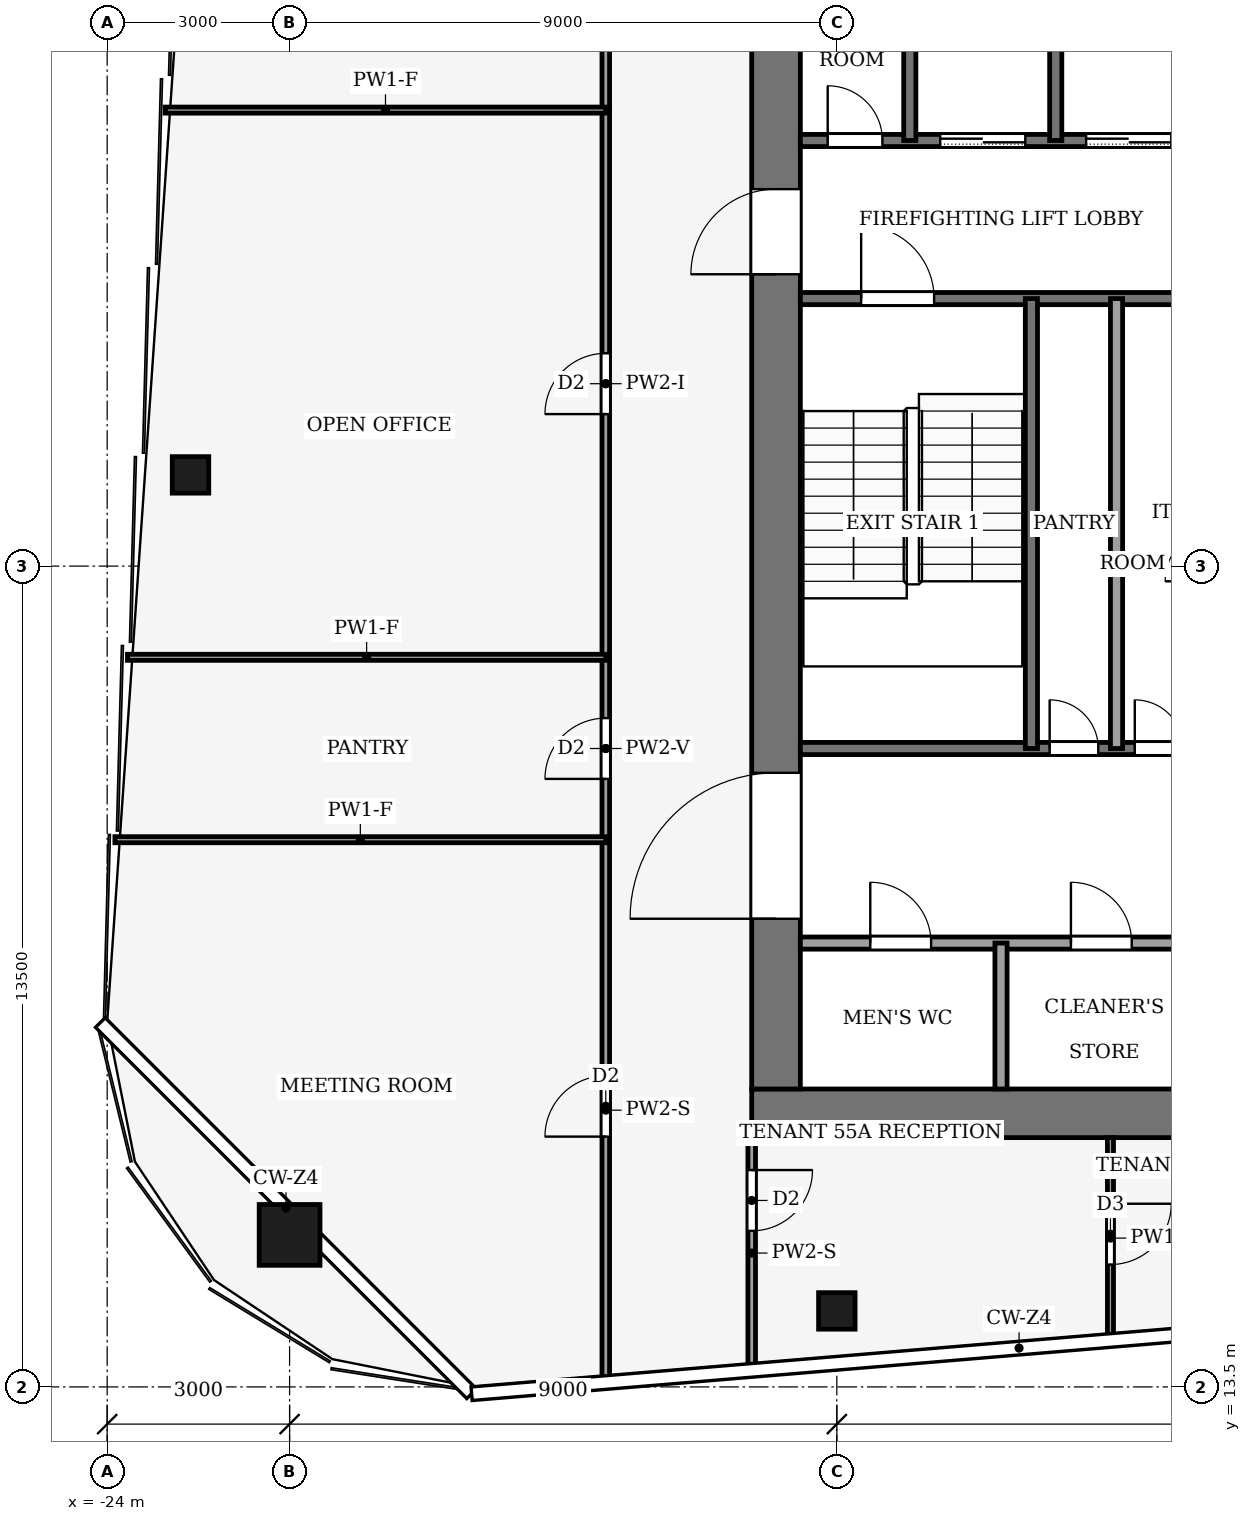
"""IFC4 building model, lengths in metres.
Left out: names, types, materials, properties, quantities, classifications, styles, units other than length and angle.
Written with IfcOpenShell. Run it as: python <this file> out.ifc"""

import sys

from ifc_helpers import new_model, si_unit, direction, frame, frame_2d, origin, origin_2d, place, context, subcontext, project, spatial, rectangle, hollow_rectangle, extrude, element, fill, save


model = new_model("IFC4")
c1 = context("Model", 3, precision=1e-05, world=origin(), true_north=direction((0.0, 1.0)))
c2 = subcontext(c1, "Body", "Model", "MODEL_VIEW")
j1 = project(units=[si_unit("LENGTHUNIT", "METRE"), si_unit("PLANEANGLEUNIT", "RADIAN")], contexts=[c1])
p1 = place(None, origin())
s1 = spatial("IfcSite", under=j1, at=p1, CompositionType="ELEMENT")
p2 = place(p1, origin())
s2 = spatial("IfcBuilding", under=s1, at=p2, CompositionType="ELEMENT")
p3 = place(p2, frame((0.0, 0.0, 242.0)))
s3 = spatial("IfcBuildingStorey", under=s2, at=p3, CompositionType="ELEMENT", Elevation=242.0)
p4 = place(p3, frame((-13.4, 18.0, -0.13), z_axis=(0.0, 0.0, 1.0), x_axis=(1.0, 0.0, 0.0)))
e1 = element("IfcWall", 1, at=p4, inside=s3, PredefinedType="SHEAR", context=c2, shape_type="SweptSolid", body=[
    extrude(rectangle(XDim=26.8, YDim=0.8, at=frame_2d((13.4, 0.0))), origin(), (0.0, 0.0, 1.0), 4.0),
])
p5 = place(p3, frame((-13.0, 18.4, -0.13), z_axis=(0.0, 0.0, 1.0), x_axis=(0.0, 1.0, 0.0)))
e2 = element("IfcWall", 2, at=p5, inside=s3, PredefinedType="SHEAR", context=c2, shape_type="SweptSolid", body=[
    extrude(rectangle(XDim=19.2, YDim=0.8, at=frame_2d((9.6, 0.0))), origin(), (0.0, 0.0, 1.0), 4.0),
])
p6 = place(p5, frame((2.8, 0.0, 0.13)))
e3 = element("IfcOpeningElement", 3, at=p6, cuts=e2, PredefinedType="OPENING", context=c2, shape_type="SweptSolid", body=[
    extrude(rectangle(XDim=2.4, YDim=2.4, at=frame_2d((1.2, 1.2))), frame((0.0, 0.41, 0.0), z_axis=(0.0, -1.0, 0.0), x_axis=(1.0, 0.0, 0.0)), (0.0, 0.0, 1.0), 0.82),
])
p7 = place(p5, frame((13.4, 0.0, 0.13)))
e4 = element("IfcOpeningElement", 4, at=p7, cuts=e2, PredefinedType="OPENING", context=c2, shape_type="SweptSolid", body=[
    extrude(rectangle(XDim=1.4, YDim=2.2, at=frame_2d((0.7, 1.1))), frame((0.0, 0.41, 0.0), z_axis=(0.0, -1.0, 0.0), x_axis=(1.0, 0.0, 0.0)), (0.0, 0.0, 1.0), 0.82),
])
p8 = place(p3, frame((-21.0, 16.0, 0.0), z_axis=(0.0, 0.0, 1.0), x_axis=(1.0, 0.0, 0.0)))
e5 = element("IfcColumn", 5, at=p8, inside=s3, PredefinedType="COLUMN", context=c2, shape_type="SweptSolid", body=[
    extrude(hollow_rectangle(XDim=1.0, YDim=1.0, WallThickness=0.045, at=origin_2d()), origin(), (0.0, 0.0, 1.0), 4.0),
])
for number, where, z_axis, x_axis in (
    (6, (-12.0, 14.75, 0.0), (0.0, 0.0, 1.0), (1.0, 0.0, 0.0)),
    (7, (-22.629, 28.5, 0.0), (0.0, 0.0, 1.0), (1.0, 0.0, 0.0)),
):
    element("IfcColumn", number, at=place(p3, frame(where, z_axis=z_axis, x_axis=x_axis)), inside=s3, PredefinedType="COLUMN", context=c2, shape_type="SweptSolid", body=[
        extrude(hollow_rectangle(XDim=0.6, YDim=0.6, WallThickness=0.025, at=origin_2d()), origin(), (0.0, 0.0, 1.0), 4.0),
    ])
p9 = place(p3, frame((-12.6, 20.8, 0.0), z_axis=(0.0, 0.0, 1.0), x_axis=(1.0, 0.0, 0.0)))
e8 = element("IfcWall", 8, at=p9, inside=s3, PredefinedType="PARTITIONING", context=c2, shape_type="SweptSolid", body=[
    extrude(rectangle(XDim=6.6, YDim=0.2, at=frame_2d((3.3, 0.0))), origin(), (0.0, 0.0, 1.0), 3.87),
])
p10 = place(p9, frame((1.15, 0.0, 0.0)))
e9 = element("IfcOpeningElement", 9, at=p10, cuts=e8, PredefinedType="OPENING", context=c2, shape_type="SweptSolid", body=[
    extrude(rectangle(XDim=1.0, YDim=2.1, at=frame_2d((0.5, 1.05))), frame((0.0, 0.11, 0.0), z_axis=(0.0, -1.0, 0.0), x_axis=(1.0, 0.0, 0.0)), (0.0, 0.0, 1.0), 0.22),
])
p11 = place(p9, frame((4.45, 0.0, 0.0)))
e10 = element("IfcOpeningElement", 10, at=p11, cuts=e8, PredefinedType="OPENING", context=c2, shape_type="SweptSolid", body=[
    extrude(rectangle(XDim=1.0, YDim=2.1, at=frame_2d((0.5, 1.05))), frame((0.0, 0.11, 0.0), z_axis=(0.0, -1.0, 0.0), x_axis=(1.0, 0.0, 0.0)), (0.0, 0.0, 1.0), 0.22),
])
p12 = place(p3, frame((-12.6, 24.0, 0.0), z_axis=(0.0, 0.0, 1.0), x_axis=(1.0, 0.0, 0.0)))
e11 = element("IfcWall", 11, at=p12, inside=s3, PredefinedType="PARTITIONING", context=c2, shape_type="SweptSolid", body=[
    extrude(rectangle(XDim=6.6, YDim=0.2, at=frame_2d((3.3, 0.0))), origin(), (0.0, 0.0, 1.0), 3.87),
])
p13 = place(p12, frame((4.1, 0.0, 0.0)))
e12 = element("IfcOpeningElement", 12, at=p13, cuts=e11, PredefinedType="OPENING", context=c2, shape_type="SweptSolid", body=[
    extrude(rectangle(XDim=0.8, YDim=2.1, at=frame_2d((0.4, 1.05))), frame((0.0, 0.11, 0.0), z_axis=(0.0, -1.0, 0.0), x_axis=(1.0, 0.0, 0.0)), (0.0, 0.0, 1.0), 0.22),
])
p14 = place(p12, frame((5.5, 0.0, 0.0)))
e13 = element("IfcOpeningElement", 13, at=p14, cuts=e11, PredefinedType="OPENING", context=c2, shape_type="SweptSolid", body=[
    extrude(rectangle(XDim=0.8, YDim=2.1, at=frame_2d((0.4, 1.05))), frame((0.0, 0.11, 0.0), z_axis=(0.0, -1.0, 0.0), x_axis=(1.0, 0.0, 0.0)), (0.0, 0.0, 1.0), 0.22),
])
p15 = place(p3, frame((-12.6, 31.4, 0.0), z_axis=(0.0, 0.0, 1.0), x_axis=(1.0, 0.0, 0.0)))
e14 = element("IfcWall", 14, at=p15, inside=s3, PredefinedType="PARTITIONING", context=c2, shape_type="SweptSolid", body=[
    extrude(rectangle(XDim=6.6, YDim=0.2, at=frame_2d((3.3, 0.0))), origin(), (0.0, 0.0, 1.0), 3.87),
])
p16 = place(p15, frame((1.0, 0.0, 0.0)))
e15 = element("IfcOpeningElement", 15, at=p16, cuts=e14, PredefinedType="OPENING", context=c2, shape_type="SweptSolid", body=[
    extrude(rectangle(XDim=1.2, YDim=2.2, at=frame_2d((0.6, 1.1))), frame((0.0, 0.11, 0.0), z_axis=(0.0, -1.0, 0.0), x_axis=(1.0, 0.0, 0.0)), (0.0, 0.0, 1.0), 0.22),
])
p17 = place(p3, frame((-12.6, 34.0, 0.0), z_axis=(0.0, 0.0, 1.0), x_axis=(1.0, 0.0, 0.0)))
e16 = element("IfcWall", 16, at=p17, inside=s3, PredefinedType="PARTITIONING", context=c2, shape_type="SweptSolid", body=[
    extrude(rectangle(XDim=6.6, YDim=0.2, at=frame_2d((3.3, 0.0))), origin(), (0.0, 0.0, 1.0), 3.87),
])
p18 = place(p17, frame((4.7, 0.0, 0.0)))
e17 = element("IfcOpeningElement", 17, at=p18, cuts=e16, PredefinedType="OPENING", context=c2, shape_type="SweptSolid", body=[
    extrude(rectangle(XDim=1.4, YDim=2.2, at=frame_2d((0.7, 1.1))), frame((0.0, 0.11, 0.0), z_axis=(0.0, -1.0, 0.0), x_axis=(1.0, 0.0, 0.0)), (0.0, 0.0, 1.0), 0.22),
])
p19 = place(p17, frame((2.3, 0.0, 0.0)))
e18 = element("IfcOpeningElement", 18, at=p19, cuts=e16, PredefinedType="OPENING", context=c2, shape_type="SweptSolid", body=[
    extrude(rectangle(XDim=1.4, YDim=2.2, at=frame_2d((0.7, 1.1))), frame((0.0, 0.11, 0.0), z_axis=(0.0, -1.0, 0.0), x_axis=(1.0, 0.0, 0.0)), (0.0, 0.0, 1.0), 0.22),
])
p20 = place(p17, frame((0.45, 0.0, 0.0)))
e19 = element("IfcOpeningElement", 19, at=p20, cuts=e16, PredefinedType="OPENING", context=c2, shape_type="SweptSolid", body=[
    extrude(rectangle(XDim=0.9, YDim=2.1, at=frame_2d((0.45, 1.05))), frame((0.0, 0.11, 0.0), z_axis=(0.0, -1.0, 0.0), x_axis=(1.0, 0.0, 0.0)), (0.0, 0.0, 1.0), 0.22),
])
p21 = place(p3, frame((-10.8, 34.0, 0.0), z_axis=(0.0, 0.0, 1.0), x_axis=(0.0, 1.0, 0.0)))
e20 = element("IfcWall", 20, at=p21, inside=s3, PredefinedType="PARTITIONING", context=c2, shape_type="SweptSolid", body=[
    extrude(rectangle(XDim=3.6, YDim=0.2, at=frame_2d((1.8, 0.0))), origin(), (0.0, 0.0, 1.0), 3.87),
])
p22 = place(p3, frame((-9.3, 18.4, 0.0), z_axis=(0.0, 0.0, 1.0), x_axis=(0.0, 1.0, 0.0)))
e21 = element("IfcWall", 21, at=p22, inside=s3, PredefinedType="PARTITIONING", context=c2, shape_type="SweptSolid", body=[
    extrude(rectangle(XDim=2.4, YDim=0.2, at=frame_2d((1.2, 0.0))), origin(), (0.0, 0.0, 1.0), 3.87),
])
p23 = place(p3, frame((-8.8, 24.0, 0.0), z_axis=(0.0, 0.0, 1.0), x_axis=(0.0, 1.0, 0.0)))
e22 = element("IfcWall", 22, at=p23, inside=s3, PredefinedType="PARTITIONING", context=c2, shape_type="SweptSolid", body=[
    extrude(rectangle(XDim=7.4, YDim=0.2, at=frame_2d((3.7, 0.0))), origin(), (0.0, 0.0, 1.0), 3.87),
])
p24 = place(p3, frame((-8.4, 34.0, 0.0), z_axis=(0.0, 0.0, 1.0), x_axis=(0.0, 1.0, 0.0)))
e23 = element("IfcWall", 23, at=p24, inside=s3, PredefinedType="PARTITIONING", context=c2, shape_type="SweptSolid", body=[
    extrude(rectangle(XDim=3.6, YDim=0.2, at=frame_2d((1.8, 0.0))), origin(), (0.0, 0.0, 1.0), 3.87),
])
p25 = place(p3, frame((-7.4, 24.0, 0.0), z_axis=(0.0, 0.0, 1.0), x_axis=(0.0, 1.0, 0.0)))
e24 = element("IfcWall", 24, at=p25, inside=s3, PredefinedType="PARTITIONING", context=c2, shape_type="SweptSolid", body=[
    extrude(rectangle(XDim=7.4, YDim=0.2, at=frame_2d((3.7, 0.0))), origin(), (0.0, 0.0, 1.0), 3.87),
])
p26 = place(p3, frame((-15.8, 13.603, 0.0), z_axis=(0.0, 0.0, 1.0), x_axis=(0.0, 1.0, 0.0)))
e25 = element("IfcWall", 25, at=p26, inside=s3, PredefinedType="PARTITIONING", context=c2, shape_type="SweptSolid", body=[
    extrude(rectangle(XDim=8.897, YDim=0.125, at=frame_2d((4.448, 0.0))), origin(), (0.0, 0.0, 1.0), 3.04),
])
p27 = place(p26, frame((4.013, 0.0, 0.0)))
e26 = element("IfcOpeningElement", 26, at=p27, cuts=e25, PredefinedType="OPENING", context=c2, shape_type="SweptSolid", body=[
    extrude(rectangle(XDim=1.0, YDim=2.1, at=frame_2d((0.5, 1.05))), frame((0.0, 0.073, 0.0), z_axis=(0.0, -1.0, 0.0), x_axis=(1.0, 0.0, 0.0)), (0.0, 0.0, 1.0), 0.145),
])
p28 = place(p3, frame((-15.8, 22.5, 0.0), z_axis=(0.0, 0.0, 1.0), x_axis=(0.0, 1.0, 0.0)))
e27 = element("IfcWall", 27, at=p28, inside=s3, PredefinedType="PARTITIONING", context=c2, shape_type="SweptSolid", body=[
    extrude(rectangle(XDim=3.0, YDim=0.125, at=frame_2d((1.5, 0.0))), origin(), (0.0, 0.0, 1.0), 3.44),
])
p29 = place(p28, frame((1.0, 0.0, 0.0)))
e28 = element("IfcOpeningElement", 28, at=p29, cuts=e27, PredefinedType="OPENING", context=c2, shape_type="SweptSolid", body=[
    extrude(rectangle(XDim=1.0, YDim=2.1, at=frame_2d((0.5, 1.05))), frame((0.0, 0.073, 0.0), z_axis=(0.0, -1.0, 0.0), x_axis=(1.0, 0.0, 0.0)), (0.0, 0.0, 1.0), 0.145),
])
p30 = place(p3, frame((-15.8, 25.5, 0.0), z_axis=(0.0, 0.0, 1.0), x_axis=(0.0, 1.0, 0.0)))
e29 = element("IfcWall", 29, at=p30, inside=s3, PredefinedType="PARTITIONING", context=c2, shape_type="SweptSolid", body=[
    extrude(rectangle(XDim=9.0, YDim=0.125, at=frame_2d((4.5, 0.0))), origin(), (0.0, 0.0, 1.0), 3.48),
])
p31 = place(p30, frame((4.0, 0.0, 0.0)))
e30 = element("IfcOpeningElement", 30, at=p31, cuts=e29, PredefinedType="OPENING", context=c2, shape_type="SweptSolid", body=[
    extrude(rectangle(XDim=1.0, YDim=2.1, at=frame_2d((0.5, 1.05))), frame((0.0, 0.073, 0.0), z_axis=(0.0, -1.0, 0.0), x_axis=(1.0, 0.0, 0.0)), (0.0, 0.0, 1.0), 0.145),
])
p32 = place(p3, frame((-15.8, 34.5, 0.0), z_axis=(0.0, 0.0, 1.0), x_axis=(0.0, 1.0, 0.0)))
e31 = element("IfcWall", 31, at=p32, inside=s3, PredefinedType="PARTITIONING", context=c2, shape_type="SweptSolid", body=[
    extrude(rectangle(XDim=12.0, YDim=0.125, at=frame_2d((6.0, 0.0))), origin(), (0.0, 0.0, 1.0), 3.14),
])
p33 = place(p32, frame((5.5, 0.0, 0.0)))
e32 = element("IfcOpeningElement", 32, at=p33, cuts=e31, PredefinedType="OPENING", context=c2, shape_type="SweptSolid", body=[
    extrude(rectangle(XDim=1.0, YDim=2.1, at=frame_2d((0.5, 1.05))), frame((0.0, 0.073, 0.0), z_axis=(0.0, -1.0, 0.0), x_axis=(1.0, 0.0, 0.0)), (0.0, 0.0, 1.0), 0.145),
])
p34 = place(p3, frame((-13.4, 17.6, 0.0), z_axis=(0.0, 0.0, 1.0), x_axis=(0.0, -1.0, 0.0)))
e33 = element("IfcWall", 33, at=p34, inside=s3, PredefinedType="PARTITIONING", context=c2, shape_type="SweptSolid", body=[
    extrude(rectangle(XDim=3.797, YDim=0.125, at=frame_2d((1.898, 0.0))), origin(), (0.0, 0.0, 1.0), 3.04),
])
p35 = place(p34, frame((0.533, 0.0, 0.0)))
e34 = element("IfcOpeningElement", 34, at=p35, cuts=e33, PredefinedType="OPENING", context=c2, shape_type="SweptSolid", body=[
    extrude(rectangle(XDim=1.0, YDim=2.1, at=frame_2d((0.5, 1.05))), frame((0.0, 0.073, 0.0), z_axis=(0.0, -1.0, 0.0), x_axis=(1.0, 0.0, 0.0)), (0.0, 0.0, 1.0), 0.145),
])
p36 = place(p3, frame((-15.8, 22.5, 0.0), z_axis=(0.0, 0.0, 1.0), x_axis=(-1.0, 0.0, 0.0)))
e35 = element("IfcWall", 35, at=p36, inside=s3, PredefinedType="PARTITIONING", context=c2, shape_type="SweptSolid", body=[
    extrude(rectangle(XDim=8.073, YDim=0.1, at=frame_2d((4.037, 0.0))), origin(), (0.0, 0.0, 1.0), 3.04),
])
p37 = place(p3, frame((-15.8, 25.5, 0.0), z_axis=(0.0, 0.0, 1.0), x_axis=(-1.0, 0.0, 0.0)))
e36 = element("IfcWall", 36, at=p37, inside=s3, PredefinedType="PARTITIONING", context=c2, shape_type="SweptSolid", body=[
    extrude(rectangle(XDim=7.866, YDim=0.1, at=frame_2d((3.933, 0.0))), origin(), (0.0, 0.0, 1.0), 3.04),
])
p38 = place(p3, frame((-15.8, 34.5, 0.0), z_axis=(0.0, 0.0, 1.0), x_axis=(-1.0, 0.0, 0.0)))
e37 = element("IfcWall", 37, at=p38, inside=s3, PredefinedType="PARTITIONING", context=c2, shape_type="SweptSolid", body=[
    extrude(rectangle(XDim=7.245, YDim=0.1, at=frame_2d((3.623, 0.0))), origin(), (0.0, 0.0, 1.0), 3.04),
])
p39 = place(p3, frame((-7.5, 17.6, 0.0), z_axis=(0.0, 0.0, 1.0), x_axis=(0.0, -1.0, 0.0)))
e38 = element("IfcWall", 38, at=p39, inside=s3, PredefinedType="PARTITIONING", context=c2, shape_type="SweptSolid", body=[
    extrude(rectangle(XDim=3.305, YDim=0.1, at=frame_2d((1.653, 0.0))), origin(), (0.0, 0.0, 1.0), 3.04),
])
p40 = place(p39, frame((1.087, 0.0, 0.0)))
e39 = element("IfcOpeningElement", 39, at=p40, cuts=e38, PredefinedType="OPENING", context=c2, shape_type="SweptSolid", body=[
    extrude(rectangle(XDim=1.0, YDim=2.1, at=frame_2d((0.5, 1.05))), frame((0.0, 0.06, 0.0), z_axis=(0.0, -1.0, 0.0), x_axis=(1.0, 0.0, 0.0)), (0.0, 0.0, 1.0), 0.12),
])
p41 = place(p18, origin())
e40 = element("IfcDoor", 40, at=p41, inside=s3, OperationType="SLIDING_TO_LEFT", PredefinedType="DOOR", context=c2, shape_type="SweptSolid", body=[
    extrude(rectangle(XDim=1.4, YDim=2.2, at=frame_2d((0.7, 1.1))), frame((0.0, 0.025, 0.0), z_axis=(0.0, -1.0, 0.0), x_axis=(1.0, 0.0, 0.0)), (0.0, 0.0, 1.0), 0.05),
])
fill(e17, e40)
p42 = place(p19, origin())
e41 = element("IfcDoor", 41, at=p42, inside=s3, OperationType="SLIDING_TO_LEFT", PredefinedType="DOOR", context=c2, shape_type="SweptSolid", body=[
    extrude(rectangle(XDim=1.4, YDim=2.2, at=frame_2d((0.7, 1.1))), frame((0.0, 0.025, 0.0), z_axis=(0.0, -1.0, 0.0), x_axis=(1.0, 0.0, 0.0)), (0.0, 0.0, 1.0), 0.05),
])
fill(e18, e41)
p43 = place(p20, origin())
e42 = element("IfcDoor", 42, at=p43, inside=s3, OperationType="SINGLE_SWING_RIGHT", PredefinedType="DOOR", context=c2, shape_type="SweptSolid", body=[
    extrude(rectangle(XDim=0.9, YDim=2.1, at=frame_2d((0.45, 1.05))), frame((0.0, 0.025, 0.0), z_axis=(0.0, -1.0, 0.0), x_axis=(1.0, 0.0, 0.0)), (0.0, 0.0, 1.0), 0.05),
])
fill(e19, e42)
p44 = place(p10, origin())
e43 = element("IfcDoor", 43, at=p44, inside=s3, OperationType="SINGLE_SWING_LEFT", PredefinedType="DOOR", context=c2, shape_type="SweptSolid", body=[
    extrude(rectangle(XDim=1.0, YDim=2.1, at=frame_2d((0.5, 1.05))), frame((0.0, 0.025, 0.0), z_axis=(0.0, -1.0, 0.0), x_axis=(1.0, 0.0, 0.0)), (0.0, 0.0, 1.0), 0.05),
])
fill(e9, e43)
p45 = place(p11, origin())
e44 = element("IfcDoor", 44, at=p45, inside=s3, OperationType="SINGLE_SWING_LEFT", PredefinedType="DOOR", context=c2, shape_type="SweptSolid", body=[
    extrude(rectangle(XDim=1.0, YDim=2.1, at=frame_2d((0.5, 1.05))), frame((0.0, 0.025, 0.0), z_axis=(0.0, -1.0, 0.0), x_axis=(1.0, 0.0, 0.0)), (0.0, 0.0, 1.0), 0.05),
])
fill(e10, e44)
p46 = place(p13, origin())
e45 = element("IfcDoor", 45, at=p46, inside=s3, OperationType="SINGLE_SWING_LEFT", PredefinedType="DOOR", context=c2, shape_type="SweptSolid", body=[
    extrude(rectangle(XDim=0.8, YDim=2.1, at=frame_2d((0.4, 1.05))), frame((0.0, 0.025, 0.0), z_axis=(0.0, -1.0, 0.0), x_axis=(1.0, 0.0, 0.0)), (0.0, 0.0, 1.0), 0.05),
])
fill(e12, e45)
p47 = place(p14, origin())
e46 = element("IfcDoor", 46, at=p47, inside=s3, OperationType="SINGLE_SWING_RIGHT", PredefinedType="DOOR", context=c2, shape_type="SweptSolid", body=[
    extrude(rectangle(XDim=0.8, YDim=2.1, at=frame_2d((0.4, 1.05))), frame((0.0, 0.025, 0.0), z_axis=(0.0, -1.0, 0.0), x_axis=(1.0, 0.0, 0.0)), (0.0, 0.0, 1.0), 0.05),
])
fill(e13, e46)
p48 = place(p16, origin())
e47 = element("IfcDoor", 47, at=p48, inside=s3, OperationType="SINGLE_SWING_RIGHT", PredefinedType="DOOR", context=c2, shape_type="SweptSolid", body=[
    extrude(rectangle(XDim=1.2, YDim=2.2, at=frame_2d((0.6, 1.1))), frame((0.0, 0.025, 0.0), z_axis=(0.0, -1.0, 0.0), x_axis=(1.0, 0.0, 0.0)), (0.0, 0.0, 1.0), 0.05),
])
fill(e15, e47)
p49 = place(p6, origin())
e48 = element("IfcDoor", 48, at=p49, inside=s3, OperationType="DOUBLE_DOOR_SINGLE_SWING", PredefinedType="DOOR", context=c2, shape_type="SweptSolid", body=[
    extrude(rectangle(XDim=2.4, YDim=2.4, at=frame_2d((1.2, 1.2))), frame((0.0, 0.025, 0.0), z_axis=(0.0, -1.0, 0.0), x_axis=(1.0, 0.0, 0.0)), (0.0, 0.0, 1.0), 0.05),
])
fill(e3, e48)
p50 = place(p7, origin())
e49 = element("IfcDoor", 49, at=p50, inside=s3, OperationType="SINGLE_SWING_RIGHT", PredefinedType="DOOR", context=c2, shape_type="SweptSolid", body=[
    extrude(rectangle(XDim=1.4, YDim=2.2, at=frame_2d((0.7, 1.1))), frame((0.0, 0.025, 0.0), z_axis=(0.0, -1.0, 0.0), x_axis=(1.0, 0.0, 0.0)), (0.0, 0.0, 1.0), 0.05),
])
fill(e4, e49)
p51 = place(p27, origin())
e50 = element("IfcDoor", 50, at=p51, inside=s3, OperationType="SINGLE_SWING_RIGHT", PredefinedType="DOOR", context=c2, shape_type="SweptSolid", body=[
    extrude(rectangle(XDim=1.0, YDim=2.1, at=frame_2d((0.5, 1.05))), frame((0.0, 0.025, 0.0), z_axis=(0.0, -1.0, 0.0), x_axis=(1.0, 0.0, 0.0)), (0.0, 0.0, 1.0), 0.05),
])
fill(e26, e50)
p52 = place(p29, origin())
e51 = element("IfcDoor", 51, at=p52, inside=s3, OperationType="SINGLE_SWING_RIGHT", PredefinedType="DOOR", context=c2, shape_type="SweptSolid", body=[
    extrude(rectangle(XDim=1.0, YDim=2.1, at=frame_2d((0.5, 1.05))), frame((0.0, 0.025, 0.0), z_axis=(0.0, -1.0, 0.0), x_axis=(1.0, 0.0, 0.0)), (0.0, 0.0, 1.0), 0.05),
])
fill(e28, e51)
p53 = place(p31, origin())
e52 = element("IfcDoor", 52, at=p53, inside=s3, OperationType="SINGLE_SWING_LEFT", PredefinedType="DOOR", context=c2, shape_type="SweptSolid", body=[
    extrude(rectangle(XDim=1.0, YDim=2.1, at=frame_2d((0.5, 1.05))), frame((0.0, 0.025, 0.0), z_axis=(0.0, -1.0, 0.0), x_axis=(1.0, 0.0, 0.0)), (0.0, 0.0, 1.0), 0.05),
])
fill(e30, e52)
p54 = place(p35, origin())
e53 = element("IfcDoor", 53, at=p54, inside=s3, OperationType="SINGLE_SWING_LEFT", PredefinedType="DOOR", context=c2, shape_type="SweptSolid", body=[
    extrude(rectangle(XDim=1.0, YDim=2.1, at=frame_2d((0.5, 1.05))), frame((0.0, 0.025, 0.0), z_axis=(0.0, -1.0, 0.0), x_axis=(1.0, 0.0, 0.0)), (0.0, 0.0, 1.0), 0.05),
])
fill(e34, e53)
p55 = place(p40, origin())
e54 = element("IfcDoor", 54, at=p55, inside=s3, OperationType="SINGLE_SWING_LEFT", PredefinedType="DOOR", context=c2, shape_type="SweptSolid", body=[
    extrude(rectangle(XDim=1.0, YDim=2.1, at=frame_2d((0.5, 1.05))), frame((0.0, 0.025, 0.0), z_axis=(0.0, -1.0, 0.0), x_axis=(1.0, 0.0, 0.0)), (0.0, 0.0, 1.0), 0.05),
])
fill(e39, e54)
save(model, sys.argv[1])
